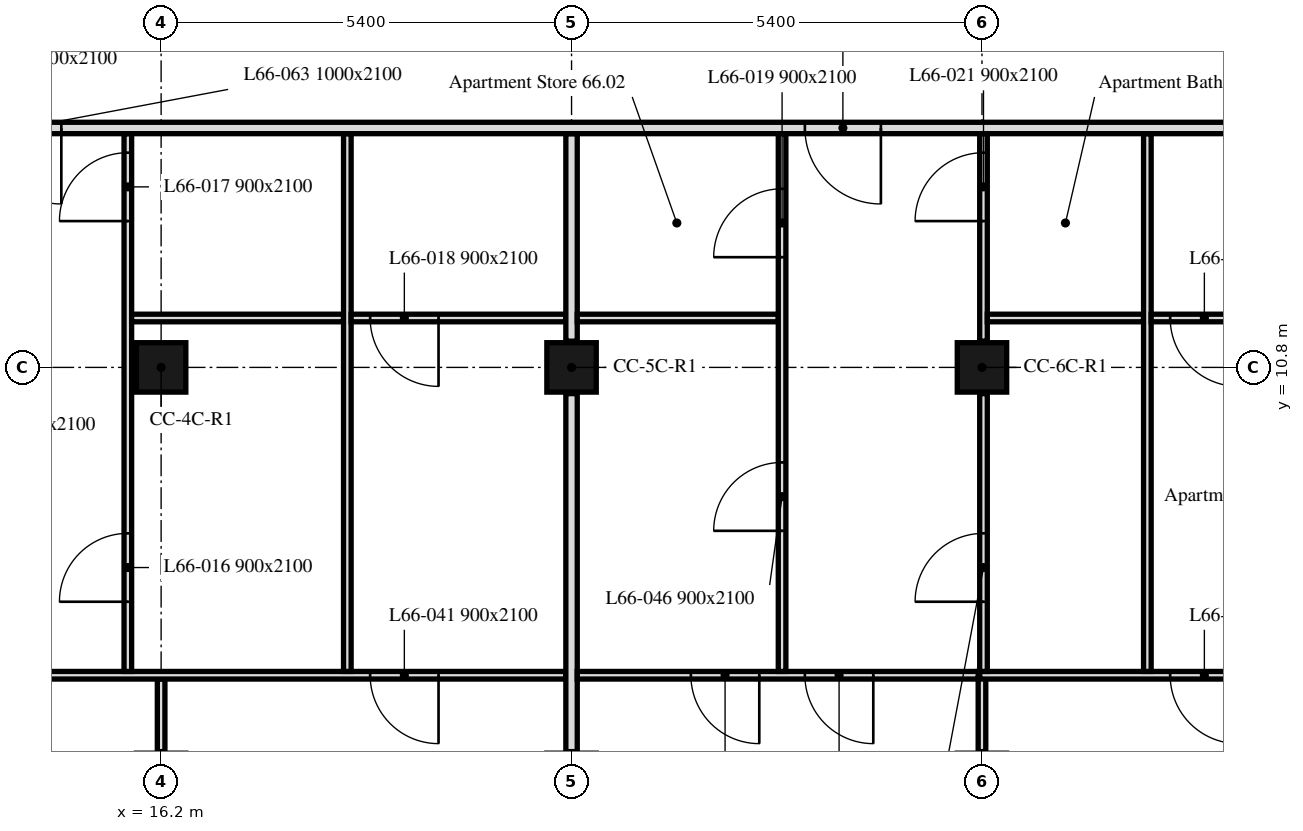
"""IFC4 building model, lengths in metres.
Left out: names, types, materials, properties, quantities, classifications, styles, units other than length and angle.
Written with IfcOpenShell. Run it as: python <this file> out.ifc"""

import sys

from ifc_helpers import new_model, si_unit, direction, frame, frame_2d, origin, origin_2d, place, context, subcontext, project, spatial, rectangle, extrude, element, fill, save


model = new_model("IFC4")
c1 = context("Model", 3, precision=1e-05, world=origin(), true_north=direction((0.0, 1.0)))
c2 = subcontext(c1, "Body", "Model", "MODEL_VIEW")
j1 = project(units=[si_unit("LENGTHUNIT", "METRE"), si_unit("PLANEANGLEUNIT", "RADIAN")], contexts=[c1])
p1 = place(None, origin())
s1 = spatial("IfcSite", under=j1, at=p1, CompositionType="ELEMENT")
p2 = place(p1, origin())
s2 = spatial("IfcBuilding", under=s1, at=p2, CompositionType="ELEMENT")
p3 = place(p2, frame((0.0, 0.0, 271.9)))
s3 = spatial("IfcBuildingStorey", under=s2, at=p3, CompositionType="ELEMENT", Elevation=271.9)
for number, where, z_axis, x_axis in (
    (1, (16.2, 10.8, 0.0), (0.0, 0.0, 1.0), (1.0, 0.0, 0.0)),
    (2, (21.6, 10.8, 0.0), (0.0, 0.0, 1.0), (1.0, 0.0, 0.0)),
    (3, (27.0, 10.8, 0.0), (0.0, 0.0, 1.0), (1.0, 0.0, 0.0)),
):
    element("IfcColumn", number, at=place(p3, frame(where, z_axis=z_axis, x_axis=x_axis)), inside=s3, PredefinedType="COLUMN", context=c2, shape_type="SweptSolid", body=[
        extrude(rectangle(XDim=0.65, YDim=0.65, at=origin_2d()), origin(), (0.0, 0.0, 1.0), 3.0),
    ])
p4 = place(p3, frame((16.2, 5.745, 0.0), z_axis=(0.0, 0.0, 1.0), x_axis=(0.0, 1.0, 0.0)))
e4 = element("IfcWall", 4, at=p4, inside=s3, PredefinedType="PARTITIONING", context=c2, shape_type="SweptSolid", body=[
    extrude(rectangle(XDim=0.955, YDim=0.1, at=frame_2d((0.478, 0.0))), origin(), (0.0, 0.0, 1.0), 2.4),
])
p5 = place(p3, frame((21.525, 6.75, 0.0), z_axis=(0.0, 0.0, 1.0), x_axis=(-1.0, 0.0, 0.0)))
e5 = element("IfcWall", 5, at=p5, inside=s3, PredefinedType="PARTITIONING", context=c2, shape_type="SweptSolid", body=[
    extrude(rectangle(XDim=10.65, YDim=0.1, at=frame_2d((5.325, 0.0))), origin(), (0.0, 0.0, 1.0), 2.4),
])
p6 = place(p5, frame((8.813, 0.0, 0.0)))
e6 = element("IfcOpeningElement", 6, at=p6, cuts=e5, PredefinedType="OPENING", context=c2, shape_type="SweptSolid", body=[
    extrude(rectangle(XDim=0.9, YDim=2.1, at=frame_2d((0.45, 1.05))), frame((0.0, 0.05, 0.0), z_axis=(0.0, -1.0, 0.0), x_axis=(1.0, 0.0, 0.0)), (0.0, 0.0, 1.0), 0.1),
])
p7 = place(p5, frame((1.675, 0.0, 0.0)))
e7 = element("IfcOpeningElement", 7, at=p7, cuts=e5, PredefinedType="OPENING", context=c2, shape_type="SweptSolid", body=[
    extrude(rectangle(XDim=0.9, YDim=2.1, at=frame_2d((0.45, 1.05))), frame((0.0, 0.05, 0.0), z_axis=(0.0, -1.0, 0.0), x_axis=(1.0, 0.0, 0.0)), (0.0, 0.0, 1.0), 0.1),
])
p8 = place(p5, frame((7.313, 0.0, 0.0)))
e8 = element("IfcOpeningElement", 8, at=p8, cuts=e5, PredefinedType="OPENING", context=c2, shape_type="SweptSolid", body=[
    extrude(rectangle(XDim=0.9, YDim=2.1, at=frame_2d((0.45, 1.05))), frame((0.0, 0.05, 0.0), z_axis=(0.0, -1.0, 0.0), x_axis=(1.0, 0.0, 0.0)), (0.0, 0.0, 1.0), 0.1),
])
p9 = place(p3, frame((15.762, 6.8, 0.0), z_axis=(0.0, 0.0, 1.0), x_axis=(0.0, 1.0, 0.0)))
e9 = element("IfcWall", 9, at=p9, inside=s3, PredefinedType="PARTITIONING", context=c2, shape_type="SweptSolid", body=[
    extrude(rectangle(XDim=7.075, YDim=0.1, at=frame_2d((3.538, 0.0))), origin(), (0.0, 0.0, 1.0), 3.0),
])
p10 = place(p9, frame((0.917, 0.0, 0.0)))
e10 = element("IfcOpeningElement", 10, at=p10, cuts=e9, PredefinedType="OPENING", context=c2, shape_type="SweptSolid", body=[
    extrude(rectangle(XDim=0.9, YDim=2.1, at=frame_2d((0.45, 1.05))), frame((0.0, 0.05, 0.0), z_axis=(0.0, -1.0, 0.0), x_axis=(1.0, 0.0, 0.0)), (0.0, 0.0, 1.0), 0.1),
])
p11 = place(p9, frame((5.925, 0.0, 0.0)))
e11 = element("IfcOpeningElement", 11, at=p11, cuts=e9, PredefinedType="OPENING", context=c2, shape_type="SweptSolid", body=[
    extrude(rectangle(XDim=0.9, YDim=2.1, at=frame_2d((0.45, 1.05))), frame((0.0, 0.05, 0.0), z_axis=(0.0, -1.0, 0.0), x_axis=(1.0, 0.0, 0.0)), (0.0, 0.0, 1.0), 0.1),
])
p12 = place(p3, frame((18.6, 11.45, 0.0), z_axis=(0.0, 0.0, 1.0), x_axis=(-1.0, 0.0, 0.0)))
e12 = element("IfcWall", 12, at=p12, inside=s3, PredefinedType="PARTITIONING", context=c2, shape_type="SweptSolid", body=[
    extrude(rectangle(XDim=2.788, YDim=0.1, at=frame_2d((1.394, 0.0))), origin(), (0.0, 0.0, 1.0), 2.4),
])
p13 = place(p3, frame((18.65, 6.8, 0.0), z_axis=(0.0, 0.0, 1.0), x_axis=(0.0, 1.0, 0.0)))
e13 = element("IfcWall", 13, at=p13, inside=s3, PredefinedType="PARTITIONING", context=c2, shape_type="SweptSolid", body=[
    extrude(rectangle(XDim=7.075, YDim=0.1, at=frame_2d((3.538, 0.0))), origin(), (0.0, 0.0, 1.0), 3.0),
])
p14 = place(p3, frame((21.6, 5.745, 0.0), z_axis=(0.0, 0.0, 1.0), x_axis=(0.0, 1.0, 0.0)))
e14 = element("IfcWall", 14, at=p14, inside=s3, PredefinedType="PARTITIONING", context=c2, shape_type="SweptSolid", body=[
    extrude(rectangle(XDim=4.71, YDim=0.15, at=frame_2d((2.355, 0.0))), origin(), (0.0, 0.0, 1.0), 2.4),
])
p15 = place(p3, frame((21.525, 11.45, 0.0), z_axis=(0.0, 0.0, 1.0), x_axis=(-1.0, 0.0, 0.0)))
e15 = element("IfcWall", 15, at=p15, inside=s3, PredefinedType="PARTITIONING", context=c2, shape_type="SweptSolid", body=[
    extrude(rectangle(XDim=2.825, YDim=0.1, at=frame_2d((1.413, 0.0))), origin(), (0.0, 0.0, 1.0), 3.0),
])
p16 = place(p15, frame((1.675, 0.0, 0.0)))
e16 = element("IfcOpeningElement", 16, at=p16, cuts=e15, PredefinedType="OPENING", context=c2, shape_type="SweptSolid", body=[
    extrude(rectangle(XDim=0.9, YDim=2.1, at=frame_2d((0.45, 1.05))), frame((0.0, 0.05, 0.0), z_axis=(0.0, -1.0, 0.0), x_axis=(1.0, 0.0, 0.0)), (0.0, 0.0, 1.0), 0.1),
])
p17 = place(p3, frame((21.6, 11.145, 0.0), z_axis=(0.0, 0.0, 1.0), x_axis=(0.0, 1.0, 0.0)))
e17 = element("IfcWall", 17, at=p17, inside=s3, PredefinedType="PARTITIONING", context=c2, shape_type="SweptSolid", body=[
    extrude(rectangle(XDim=2.73, YDim=0.15, at=frame_2d((1.365, 0.0))), origin(), (0.0, 0.0, 1.0), 2.4),
])
p18 = place(p3, frame((27.0, 5.745, 0.0), z_axis=(0.0, 0.0, 1.0), x_axis=(0.0, 1.0, 0.0)))
e18 = element("IfcWall", 18, at=p18, inside=s3, PredefinedType="PARTITIONING", context=c2, shape_type="SweptSolid", body=[
    extrude(rectangle(XDim=1.055, YDim=0.1, at=frame_2d((0.527, 0.0))), origin(), (0.0, 0.0, 1.0), 2.4),
])
p19 = place(p3, frame((26.95, 6.75, 0.0), z_axis=(0.0, 0.0, 1.0), x_axis=(-1.0, 0.0, 0.0)))
e19 = element("IfcWall", 19, at=p19, inside=s3, PredefinedType="PARTITIONING", context=c2, shape_type="SweptSolid", body=[
    extrude(rectangle(XDim=5.275, YDim=0.1, at=frame_2d((2.637, 0.0))), origin(), (0.0, 0.0, 1.0), 3.0),
])
p20 = place(p19, frame((2.88, 0.0, 0.0)))
e20 = element("IfcOpeningElement", 20, at=p20, cuts=e19, PredefinedType="OPENING", context=c2, shape_type="SweptSolid", body=[
    extrude(rectangle(XDim=0.9, YDim=2.1, at=frame_2d((0.45, 1.05))), frame((0.0, 0.05, 0.0), z_axis=(0.0, -1.0, 0.0), x_axis=(1.0, 0.0, 0.0)), (0.0, 0.0, 1.0), 0.1),
])
p21 = place(p19, frame((1.38, 0.0, 0.0)))
e21 = element("IfcOpeningElement", 21, at=p21, cuts=e19, PredefinedType="OPENING", context=c2, shape_type="SweptSolid", body=[
    extrude(rectangle(XDim=0.9, YDim=2.1, at=frame_2d((0.45, 1.05))), frame((0.0, 0.05, 0.0), z_axis=(0.0, -1.0, 0.0), x_axis=(1.0, 0.0, 0.0)), (0.0, 0.0, 1.0), 0.1),
])
p22 = place(p3, frame((32.325, 6.75, 0.0), z_axis=(0.0, 0.0, 1.0), x_axis=(-1.0, 0.0, 0.0)))
e22 = element("IfcWall", 22, at=p22, inside=s3, PredefinedType="PARTITIONING", context=c2, shape_type="SweptSolid", body=[
    extrude(rectangle(XDim=5.355, YDim=0.1, at=frame_2d((2.677, 0.0))), origin(), (0.0, 0.0, 1.0), 3.0),
])
p23 = place(p22, frame((1.949, 0.0, 0.0)))
e23 = element("IfcOpeningElement", 23, at=p23, cuts=e22, PredefinedType="OPENING", context=c2, shape_type="SweptSolid", body=[
    extrude(rectangle(XDim=0.9, YDim=2.1, at=frame_2d((0.45, 1.05))), frame((0.0, 0.05, 0.0), z_axis=(0.0, -1.0, 0.0), x_axis=(1.0, 0.0, 0.0)), (0.0, 0.0, 1.0), 0.1),
])
p24 = place(p3, frame((24.32, 11.45, 0.0), z_axis=(0.0, 0.0, 1.0), x_axis=(-1.0, 0.0, 0.0)))
e24 = element("IfcWall", 24, at=p24, inside=s3, PredefinedType="PARTITIONING", context=c2, shape_type="SweptSolid", body=[
    extrude(rectangle(XDim=2.645, YDim=0.1, at=frame_2d((1.323, 0.0))), origin(), (0.0, 0.0, 1.0), 3.0),
])
p25 = place(p3, frame((24.37, 6.8, 0.0), z_axis=(0.0, 0.0, 1.0), x_axis=(0.0, 1.0, 0.0)))
e25 = element("IfcWall", 25, at=p25, inside=s3, PredefinedType="PARTITIONING", context=c2, shape_type="SweptSolid", body=[
    extrude(rectangle(XDim=7.075, YDim=0.1, at=frame_2d((3.538, 0.0))), origin(), (0.0, 0.0, 1.0), 3.0),
])
p26 = place(p25, frame((5.45, 0.0, 0.0)))
e26 = element("IfcOpeningElement", 26, at=p26, cuts=e25, PredefinedType="OPENING", context=c2, shape_type="SweptSolid", body=[
    extrude(rectangle(XDim=0.9, YDim=2.1, at=frame_2d((0.45, 1.05))), frame((0.0, 0.05, 0.0), z_axis=(0.0, -1.0, 0.0), x_axis=(1.0, 0.0, 0.0)), (0.0, 0.0, 1.0), 0.1),
])
p27 = place(p25, frame((1.85, 0.0, 0.0)))
e27 = element("IfcOpeningElement", 27, at=p27, cuts=e25, PredefinedType="OPENING", context=c2, shape_type="SweptSolid", body=[
    extrude(rectangle(XDim=0.9, YDim=2.1, at=frame_2d((0.45, 1.05))), frame((0.0, 0.05, 0.0), z_axis=(0.0, -1.0, 0.0), x_axis=(1.0, 0.0, 0.0)), (0.0, 0.0, 1.0), 0.1),
])
p28 = place(p3, frame((27.02, 6.8, 0.0), z_axis=(0.0, 0.0, 1.0), x_axis=(0.0, 1.0, 0.0)))
e28 = element("IfcWall", 28, at=p28, inside=s3, PredefinedType="PARTITIONING", context=c2, shape_type="SweptSolid", body=[
    extrude(rectangle(XDim=3.655, YDim=0.1, at=frame_2d((1.828, 0.0))), origin(), (0.0, 0.0, 1.0), 2.4),
])
p29 = place(p28, frame((0.917, 0.0, 0.0)))
e29 = element("IfcOpeningElement", 29, at=p29, cuts=e28, PredefinedType="OPENING", context=c2, shape_type="SweptSolid", body=[
    extrude(rectangle(XDim=0.9, YDim=2.1, at=frame_2d((0.45, 1.05))), frame((0.0, 0.05, 0.0), z_axis=(0.0, -1.0, 0.0), x_axis=(1.0, 0.0, 0.0)), (0.0, 0.0, 1.0), 0.1),
])
p30 = place(p3, frame((27.02, 11.145, 0.0), z_axis=(0.0, 0.0, 1.0), x_axis=(0.0, 1.0, 0.0)))
e30 = element("IfcWall", 30, at=p30, inside=s3, PredefinedType="PARTITIONING", context=c2, shape_type="SweptSolid", body=[
    extrude(rectangle(XDim=2.73, YDim=0.1, at=frame_2d((1.365, 0.0))), origin(), (0.0, 0.0, 1.0), 2.4),
])
p31 = place(p30, frame((1.58, 0.0, 0.0)))
e31 = element("IfcOpeningElement", 31, at=p31, cuts=e30, PredefinedType="OPENING", context=c2, shape_type="SweptSolid", body=[
    extrude(rectangle(XDim=0.9, YDim=2.1, at=frame_2d((0.45, 1.05))), frame((0.0, 0.05, 0.0), z_axis=(0.0, -1.0, 0.0), x_axis=(1.0, 0.0, 0.0)), (0.0, 0.0, 1.0), 0.1),
])
p32 = place(p3, frame((29.126, 11.45, 0.0), z_axis=(0.0, 0.0, 1.0), x_axis=(-1.0, 0.0, 0.0)))
e32 = element("IfcWall", 32, at=p32, inside=s3, PredefinedType="PARTITIONING", context=c2, shape_type="SweptSolid", body=[
    extrude(rectangle(XDim=2.056, YDim=0.1, at=frame_2d((1.028, 0.0))), origin(), (0.0, 0.0, 1.0), 3.0),
])
p33 = place(p3, frame((29.176, 6.8, 0.0), z_axis=(0.0, 0.0, 1.0), x_axis=(0.0, 1.0, 0.0)))
e33 = element("IfcWall", 33, at=p33, inside=s3, PredefinedType="PARTITIONING", context=c2, shape_type="SweptSolid", body=[
    extrude(rectangle(XDim=7.075, YDim=0.1, at=frame_2d((3.538, 0.0))), origin(), (0.0, 0.0, 1.0), 3.0),
])
p34 = place(p3, frame((32.325, 11.45, 0.0), z_axis=(0.0, 0.0, 1.0), x_axis=(-1.0, 0.0, 0.0)))
e34 = element("IfcWall", 34, at=p34, inside=s3, PredefinedType="PARTITIONING", context=c2, shape_type="SweptSolid", body=[
    extrude(rectangle(XDim=3.099, YDim=0.1, at=frame_2d((1.549, 0.0))), origin(), (0.0, 0.0, 1.0), 3.0),
])
p35 = place(p34, frame((1.949, 0.0, 0.0)))
e35 = element("IfcOpeningElement", 35, at=p35, cuts=e34, PredefinedType="OPENING", context=c2, shape_type="SweptSolid", body=[
    extrude(rectangle(XDim=0.9, YDim=2.1, at=frame_2d((0.45, 1.05))), frame((0.0, 0.05, 0.0), z_axis=(0.0, -1.0, 0.0), x_axis=(1.0, 0.0, 0.0)), (0.0, 0.0, 1.0), 0.1),
])
p36 = place(p3, frame((47.849, 13.95, 0.0), z_axis=(0.0, 0.0, 1.0), x_axis=(-1.0, 0.0, 0.0)))
e36 = element("IfcWall", 36, at=p36, inside=s3, PredefinedType="PARTITIONING", context=c2, shape_type="SweptSolid", body=[
    extrude(rectangle(XDim=41.698, YDim=0.15, at=frame_2d((20.849, 0.0))), origin(), (0.0, 0.0, 1.0), 2.4),
])
p37 = place(p36, frame((37.749, 0.0, 0.0)))
e37 = element("IfcOpeningElement", 37, at=p37, cuts=e36, PredefinedType="OPENING", context=c2, shape_type="SweptSolid", body=[
    extrude(rectangle(XDim=1.0, YDim=2.1, at=frame_2d((0.5, 1.05))), frame((0.0, 0.075, 0.0), z_axis=(0.0, -1.0, 0.0), x_axis=(1.0, 0.0, 0.0)), (0.0, 0.0, 1.0), 0.15),
])
p38 = place(p36, frame((32.962, 0.0, 0.0)))
e38 = element("IfcOpeningElement", 38, at=p38, cuts=e36, PredefinedType="OPENING", context=c2, shape_type="SweptSolid", body=[
    extrude(rectangle(XDim=1.0, YDim=2.1, at=frame_2d((0.5, 1.05))), frame((0.0, 0.075, 0.0), z_axis=(0.0, -1.0, 0.0), x_axis=(1.0, 0.0, 0.0)), (0.0, 0.0, 1.0), 0.15),
])
p39 = place(p36, frame((22.179, 0.0, 0.0)))
e39 = element("IfcOpeningElement", 39, at=p39, cuts=e36, PredefinedType="OPENING", context=c2, shape_type="SweptSolid", body=[
    extrude(rectangle(XDim=1.0, YDim=2.1, at=frame_2d((0.5, 1.05))), frame((0.0, 0.075, 0.0), z_axis=(0.0, -1.0, 0.0), x_axis=(1.0, 0.0, 0.0)), (0.0, 0.0, 1.0), 0.15),
])
p40 = place(p36, frame((9.193, 0.0, 0.0)))
e40 = element("IfcOpeningElement", 40, at=p40, cuts=e36, PredefinedType="OPENING", context=c2, shape_type="SweptSolid", body=[
    extrude(rectangle(XDim=1.0, YDim=2.1, at=frame_2d((0.5, 1.05))), frame((0.0, 0.075, 0.0), z_axis=(0.0, -1.0, 0.0), x_axis=(1.0, 0.0, 0.0)), (0.0, 0.0, 1.0), 0.15),
])
p41 = place(p10, origin())
e41 = element("IfcDoor", 41, at=p41, inside=s3, OperationType="SINGLE_SWING_RIGHT", PredefinedType="DOOR", context=c2, shape_type="SweptSolid", body=[
    extrude(rectangle(XDim=0.9, YDim=2.1, at=frame_2d((0.45, 1.05))), frame((0.0, 0.025, 0.0), z_axis=(0.0, -1.0, 0.0), x_axis=(1.0, 0.0, 0.0)), (0.0, 0.0, 1.0), 0.05),
])
fill(e10, e41)
p42 = place(p11, origin())
e42 = element("IfcDoor", 42, at=p42, inside=s3, OperationType="SINGLE_SWING_RIGHT", PredefinedType="DOOR", context=c2, shape_type="SweptSolid", body=[
    extrude(rectangle(XDim=0.9, YDim=2.1, at=frame_2d((0.45, 1.05))), frame((0.0, 0.025, 0.0), z_axis=(0.0, -1.0, 0.0), x_axis=(1.0, 0.0, 0.0)), (0.0, 0.0, 1.0), 0.05),
])
fill(e11, e42)
p43 = place(p16, origin())
e43 = element("IfcDoor", 43, at=p43, inside=s3, OperationType="SINGLE_SWING_RIGHT", PredefinedType="DOOR", context=c2, shape_type="SweptSolid", body=[
    extrude(rectangle(XDim=0.9, YDim=2.1, at=frame_2d((0.45, 1.05))), frame((0.0, 0.025, 0.0), z_axis=(0.0, -1.0, 0.0), x_axis=(1.0, 0.0, 0.0)), (0.0, 0.0, 1.0), 0.05),
])
fill(e16, e43)
p44 = place(p26, origin())
e44 = element("IfcDoor", 44, at=p44, inside=s3, OperationType="SINGLE_SWING_RIGHT", PredefinedType="DOOR", context=c2, shape_type="SweptSolid", body=[
    extrude(rectangle(XDim=0.9, YDim=2.1, at=frame_2d((0.45, 1.05))), frame((0.0, 0.025, 0.0), z_axis=(0.0, -1.0, 0.0), x_axis=(1.0, 0.0, 0.0)), (0.0, 0.0, 1.0), 0.05),
])
fill(e26, e44)
p45 = place(p29, origin())
e45 = element("IfcDoor", 45, at=p45, inside=s3, OperationType="SINGLE_SWING_LEFT", PredefinedType="DOOR", context=c2, shape_type="SweptSolid", body=[
    extrude(rectangle(XDim=0.9, YDim=2.1, at=frame_2d((0.45, 1.05))), frame((0.0, 0.025, 0.0), z_axis=(0.0, -1.0, 0.0), x_axis=(1.0, 0.0, 0.0)), (0.0, 0.0, 1.0), 0.05),
])
fill(e29, e45)
p46 = place(p31, origin())
e46 = element("IfcDoor", 46, at=p46, inside=s3, OperationType="SINGLE_SWING_LEFT", PredefinedType="DOOR", context=c2, shape_type="SweptSolid", body=[
    extrude(rectangle(XDim=0.9, YDim=2.1, at=frame_2d((0.45, 1.05))), frame((0.0, 0.025, 0.0), z_axis=(0.0, -1.0, 0.0), x_axis=(1.0, 0.0, 0.0)), (0.0, 0.0, 1.0), 0.05),
])
fill(e31, e46)
p47 = place(p35, origin())
e47 = element("IfcDoor", 47, at=p47, inside=s3, OperationType="SINGLE_SWING_LEFT", PredefinedType="DOOR", context=c2, shape_type="SweptSolid", body=[
    extrude(rectangle(XDim=0.9, YDim=2.1, at=frame_2d((0.45, 1.05))), frame((0.0, 0.025, 0.0), z_axis=(0.0, -1.0, 0.0), x_axis=(1.0, 0.0, 0.0)), (0.0, 0.0, 1.0), 0.05),
])
fill(e35, e47)
p48 = place(p7, origin())
e48 = element("IfcDoor", 48, at=p48, inside=s3, OperationType="SINGLE_SWING_LEFT", PredefinedType="DOOR", context=c2, shape_type="SweptSolid", body=[
    extrude(rectangle(XDim=0.9, YDim=2.1, at=frame_2d((0.45, 1.05))), frame((0.0, 0.025, 0.0), z_axis=(0.0, -1.0, 0.0), x_axis=(1.0, 0.0, 0.0)), (0.0, 0.0, 1.0), 0.05),
])
fill(e7, e48)
p49 = place(p20, origin())
e49 = element("IfcDoor", 49, at=p49, inside=s3, OperationType="SINGLE_SWING_RIGHT", PredefinedType="DOOR", context=c2, shape_type="SweptSolid", body=[
    extrude(rectangle(XDim=0.9, YDim=2.1, at=frame_2d((0.45, 1.05))), frame((0.0, 0.025, 0.0), z_axis=(0.0, -1.0, 0.0), x_axis=(1.0, 0.0, 0.0)), (0.0, 0.0, 1.0), 0.05),
])
fill(e20, e49)
p50 = place(p23, origin())
e50 = element("IfcDoor", 50, at=p50, inside=s3, OperationType="SINGLE_SWING_LEFT", PredefinedType="DOOR", context=c2, shape_type="SweptSolid", body=[
    extrude(rectangle(XDim=0.9, YDim=2.1, at=frame_2d((0.45, 1.05))), frame((0.0, 0.025, 0.0), z_axis=(0.0, -1.0, 0.0), x_axis=(1.0, 0.0, 0.0)), (0.0, 0.0, 1.0), 0.05),
])
fill(e23, e50)
p51 = place(p27, origin())
e51 = element("IfcDoor", 51, at=p51, inside=s3, OperationType="SINGLE_SWING_LEFT", PredefinedType="DOOR", context=c2, shape_type="SweptSolid", body=[
    extrude(rectangle(XDim=0.9, YDim=2.1, at=frame_2d((0.45, 1.05))), frame((0.0, 0.025, 0.0), z_axis=(0.0, -1.0, 0.0), x_axis=(1.0, 0.0, 0.0)), (0.0, 0.0, 1.0), 0.05),
])
fill(e27, e51)
p52 = place(p21, origin())
e52 = element("IfcDoor", 52, at=p52, inside=s3, OperationType="SINGLE_SWING_LEFT", PredefinedType="DOOR", context=c2, shape_type="SweptSolid", body=[
    extrude(rectangle(XDim=0.9, YDim=2.1, at=frame_2d((0.45, 1.05))), frame((0.0, 0.025, 0.0), z_axis=(0.0, -1.0, 0.0), x_axis=(1.0, 0.0, 0.0)), (0.0, 0.0, 1.0), 0.05),
])
fill(e21, e52)
p53 = place(p38, origin())
e53 = element("IfcDoor", 53, at=p53, inside=s3, OperationType="SINGLE_SWING_LEFT", PredefinedType="DOOR", context=c2, shape_type="SweptSolid", body=[
    extrude(rectangle(XDim=1.0, YDim=2.1, at=frame_2d((0.5, 1.05))), frame((0.0, 0.025, 0.0), z_axis=(0.0, -1.0, 0.0), x_axis=(1.0, 0.0, 0.0)), (0.0, 0.0, 1.0), 0.05),
])
fill(e38, e53)
p54 = place(p39, origin())
e54 = element("IfcDoor", 54, at=p54, inside=s3, OperationType="SINGLE_SWING_RIGHT", PredefinedType="DOOR", context=c2, shape_type="SweptSolid", body=[
    extrude(rectangle(XDim=1.0, YDim=2.1, at=frame_2d((0.5, 1.05))), frame((0.0, 0.025, 0.0), z_axis=(0.0, -1.0, 0.0), x_axis=(1.0, 0.0, 0.0)), (0.0, 0.0, 1.0), 0.05),
])
fill(e39, e54)
save(model, sys.argv[1])
